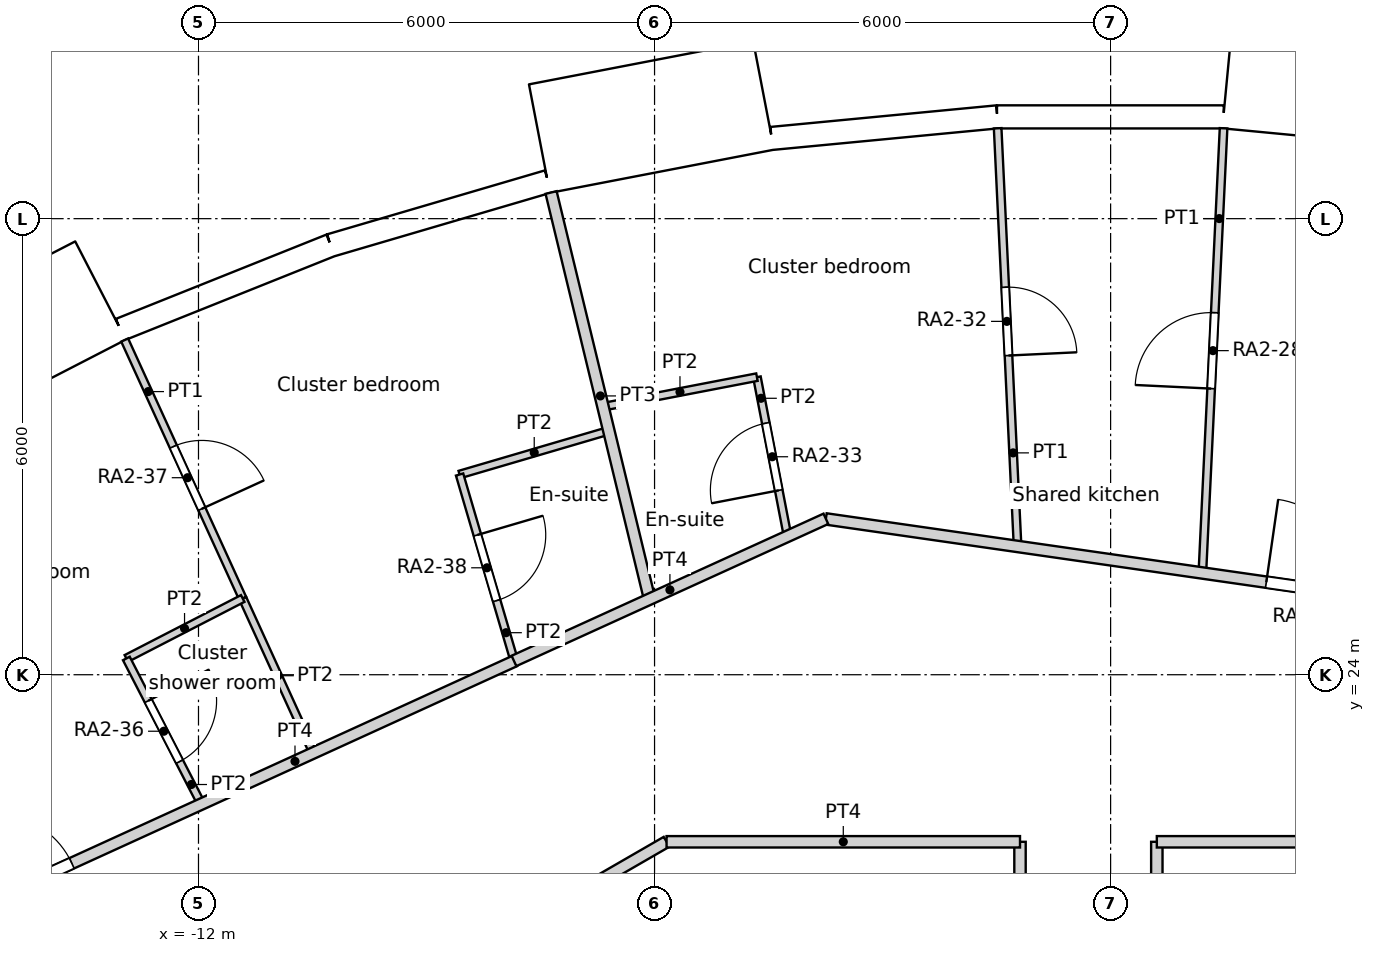
"""IFC4 building model, lengths in metres.
Left out: names, types, materials, properties, quantities, classifications, styles, units other than length and angle.
Written with IfcOpenShell. Run it as: python <this file> out.ifc"""

import sys

from ifc_helpers import new_model, si_unit, direction, frame, frame_2d, origin, origin_2d, place, context, subcontext, project, spatial, rectangle, circle, extrude, element, fill, save


model = new_model("IFC4")
c1 = context("Model", 3, precision=1e-05, world=origin(), true_north=direction((0.0, 1.0)))
c2 = subcontext(c1, "Body", "Model", "MODEL_VIEW")
j1 = project(units=[si_unit("LENGTHUNIT", "METRE"), si_unit("PLANEANGLEUNIT", "RADIAN")], contexts=[c1])
p1 = place(None, origin())
s1 = spatial("IfcSite", under=j1, at=p1, CompositionType="ELEMENT")
p2 = place(p1, origin())
s2 = spatial("IfcBuilding", under=s1, at=p2, CompositionType="ELEMENT")
p3 = place(p2, frame((0.0, 0.0, 39.0)))
s3 = spatial("IfcBuildingStorey", under=s2, at=p3, CompositionType="ELEMENT", Elevation=39.0)
for number, where, z_axis, x_axis in (
    (1, (1.44, 30.24, 0.0), (0.0, 0.0, 1.0), (1.0, 0.0, 0.0)),
    (2, (-4.309, 29.966, 0.0), (0.0, 0.0, 1.0), (1.0, 0.0, 0.0)),
    (3, (-9.902, 28.61, 0.0), (0.0, 0.0, 1.0), (1.0, 0.0, 0.0)),
):
    element("IfcColumn", number, at=place(p3, frame(where, z_axis=z_axis, x_axis=x_axis)), inside=s3, PredefinedType="COLUMN", context=c2, shape_type="SweptSolid", body=[
        extrude(circle(Radius=0.7, at=origin_2d()), origin(), (0.0, 0.0, 1.0), 3.6),
    ])
for number, where, z_axis, x_axis in (
    (4, (-1.427, 24.506, 0.0), (0.0, 0.0, 1.0), (1.0, 0.0, 0.0)),
    (5, (-7.04, 23.516, 0.0), (0.0, 0.0, 1.0), (1.0, 0.0, 0.0)),
    (6, (-12.274, 21.259, 0.0), (0.0, 0.0, 1.0), (1.0, 0.0, 0.0)),
):
    element("IfcColumn", number, at=place(p3, frame(where, z_axis=z_axis, x_axis=x_axis)), inside=s3, PredefinedType="COLUMN", context=c2, shape_type="SweptSolid", body=[
        extrude(circle(Radius=0.75, at=origin_2d()), origin(), (0.0, 0.0, 1.0), 3.6),
    ])
p4 = place(p3, frame((4.527, 31.627, -0.45), z_axis=(0.0, 0.0, 1.0), x_axis=(-0.995472768558, 0.09504718333, 0.0)))
e7 = element("IfcWall", 7, at=p4, inside=s3, PredefinedType="ELEMENTEDWALL", context=c2, shape_type="SweptSolid", body=[
    extrude(rectangle(XDim=3.0, YDim=1.45, at=frame_2d((1.5, 0.0))), origin(), (0.0, 0.0, 1.0), 3.6),
])
p5 = place(p4, frame((1.5, 0.0, 2.0)))
e8 = element("IfcOpeningElement", 8, at=p5, cuts=e7, PredefinedType="OPENING", context=c2, shape_type="SweptSolid", body=[
    extrude(circle(Radius=0.9, at=origin_2d()), frame((0.0, 0.735, 0.0), z_axis=(0.0, -1.0, 0.0), x_axis=(1.0, 0.0, 0.0)), (0.0, 0.0, 1.0), 1.47),
])
p6 = place(p3, frame((1.487, 31.339, 0.0), z_axis=(0.0, 0.0, 1.0), x_axis=(-1.0, 0.0, 0.0)))
e9 = element("IfcWall", 9, at=p6, inside=s3, PredefinedType="SOLIDWALL", context=c2, shape_type="SweptSolid", body=[
    extrude(rectangle(XDim=2.98, YDim=0.3, at=frame_2d((1.49, 0.0))), origin(), (0.0, 0.0, 1.0), 3.15),
])
p7 = place(p6, frame((1.49, 0.0, 1.55)))
e10 = element("IfcOpeningElement", 10, at=p7, cuts=e9, PredefinedType="OPENING", context=c2, shape_type="SweptSolid", body=[
    extrude(circle(Radius=0.9, at=origin_2d()), frame((0.0, 0.16, 0.0), z_axis=(0.0, -1.0, 0.0), x_axis=(1.0, 0.0, 0.0)), (0.0, 0.0, 1.0), 0.32),
])
p8 = place(p3, frame((-1.493, 31.339, 0.0), z_axis=(0.0, 0.0, 1.0), x_axis=(-0.995472611385, -0.095048829468, 0.0)))
e11 = element("IfcWall", 11, at=p8, inside=s3, PredefinedType="SOLIDWALL", context=c2, shape_type="SweptSolid", body=[
    extrude(rectangle(XDim=2.979, YDim=0.3, at=frame_2d((1.49, 0.0))), origin(), (0.0, 0.0, 1.0), 3.15),
])
p9 = place(p8, frame((1.49, 0.0, 1.55)))
e12 = element("IfcOpeningElement", 12, at=p9, cuts=e11, PredefinedType="OPENING", context=c2, shape_type="SweptSolid", body=[
    extrude(circle(Radius=0.9, at=origin_2d()), frame((0.0, 0.16, 0.0), z_axis=(0.0, -1.0, 0.0), x_axis=(1.0, 0.0, 0.0)), (0.0, 0.0, 1.0), 0.32),
])
p10 = place(p3, frame((-4.567, 31.621, -0.45), z_axis=(0.0, 0.0, 1.0), x_axis=(-0.981921602273, -0.189288052949, 0.0)))
e13 = element("IfcWall", 13, at=p10, inside=s3, PredefinedType="ELEMENTEDWALL", context=c2, shape_type="SweptSolid", body=[
    extrude(rectangle(XDim=3.0, YDim=1.45, at=frame_2d((1.5, 0.0))), origin(), (0.0, 0.0, 1.0), 3.6),
])
p11 = place(p10, frame((1.5, 0.0, 2.0)))
e14 = element("IfcOpeningElement", 14, at=p11, cuts=e13, PredefinedType="OPENING", context=c2, shape_type="SweptSolid", body=[
    extrude(circle(Radius=0.9, at=origin_2d()), frame((0.0, 0.735, 0.0), z_axis=(0.0, -1.0, 0.0), x_axis=(1.0, 0.0, 0.0)), (0.0, 0.0, 1.0), 1.47),
])
p12 = place(p3, frame((-7.403, 30.488, 0.0), z_axis=(0.0, 0.0, 1.0), x_axis=(-0.959501085144, -0.281704930036, 0.0)))
e15 = element("IfcWall", 15, at=p12, inside=s3, PredefinedType="SOLIDWALL", context=c2, shape_type="SweptSolid", body=[
    extrude(rectangle(XDim=2.979, YDim=0.3, at=frame_2d((1.49, 0.0))), origin(), (0.0, 0.0, 1.0), 3.15),
])
p13 = place(p12, frame((1.49, 0.0, 1.55)))
e16 = element("IfcOpeningElement", 16, at=p13, cuts=e15, PredefinedType="OPENING", context=c2, shape_type="SweptSolid", body=[
    extrude(circle(Radius=0.9, at=origin_2d()), frame((0.0, 0.16, 0.0), z_axis=(0.0, -1.0, 0.0), x_axis=(1.0, 0.0, 0.0)), (0.0, 0.0, 1.0), 0.32),
])
p14 = place(p3, frame((-10.261, 29.649, 0.0), z_axis=(0.0, 0.0, 1.0), x_axis=(-0.928374947, -0.371644935098, 0.0)))
e17 = element("IfcWall", 17, at=p14, inside=s3, PredefinedType="SOLIDWALL", context=c2, shape_type="SweptSolid", body=[
    extrude(rectangle(XDim=2.98, YDim=0.3, at=frame_2d((1.49, 0.0))), origin(), (0.0, 0.0, 1.0), 3.15),
])
p15 = place(p14, frame((1.49, 0.0, 1.55)))
e18 = element("IfcOpeningElement", 18, at=p15, cuts=e17, PredefinedType="OPENING", context=c2, shape_type="SweptSolid", body=[
    extrude(circle(Radius=0.9, at=origin_2d()), frame((0.0, 0.16, 0.0), z_axis=(0.0, -1.0, 0.0), x_axis=(1.0, 0.0, 0.0)), (0.0, 0.0, 1.0), 0.32),
])
p16 = place(p3, frame((-13.291, 29.053, -0.45), z_axis=(0.0, 0.0, 1.0), x_axis=(-0.888858064689, -0.458182650083, 0.0)))
e19 = element("IfcWall", 19, at=p16, inside=s3, PredefinedType="ELEMENTEDWALL", context=c2, shape_type="SweptSolid", body=[
    extrude(rectangle(XDim=3.0, YDim=1.45, at=frame_2d((1.5, 0.0))), origin(), (0.0, 0.0, 1.0), 3.6),
])
p17 = place(p16, frame((1.5, 0.0, 2.0)))
e20 = element("IfcOpeningElement", 20, at=p17, cuts=e19, PredefinedType="OPENING", context=c2, shape_type="SweptSolid", body=[
    extrude(circle(Radius=0.9, at=origin_2d()), frame((0.0, 0.735, 0.0), z_axis=(0.0, -1.0, 0.0), x_axis=(1.0, 0.0, 0.0)), (0.0, 0.0, 1.0), 1.47),
])
p18 = place(p3, frame((-1.192, 11.8, 0.0), z_axis=(0.0, 0.0, 1.0), x_axis=(0.0, 1.0, 0.0)))
e21 = element("IfcWall", 21, at=p18, inside=s3, PredefinedType="PARTITIONING", context=c2, shape_type="SweptSolid", body=[
    extrude(rectangle(XDim=10.002, YDim=0.15, at=frame_2d((5.001, 0.0))), origin(), (0.0, 0.0, 1.0), 3.15),
])
p19 = place(p3, frame((-5.842, 21.802, 0.0), z_axis=(0.0, 0.0, 1.0), x_axis=(1.0, 0.0, 0.0)))
e22 = element("IfcWall", 22, at=p19, inside=s3, PredefinedType="PARTITIONING", context=c2, shape_type="SweptSolid", body=[
    extrude(rectangle(XDim=4.65, YDim=0.15, at=frame_2d((2.325, 0.0))), origin(), (0.0, 0.0, 1.0), 3.15),
])
p20 = place(p3, frame((-14.0, 17.092, 0.0), z_axis=(0.0, 0.0, 1.0), x_axis=(0.86602719091, 0.499996904595, 0.0)))
e23 = element("IfcWall", 23, at=p20, inside=s3, PredefinedType="PARTITIONING", context=c2, shape_type="SweptSolid", body=[
    extrude(rectangle(XDim=9.42, YDim=0.15, at=frame_2d((4.71, 0.0))), origin(), (0.0, 0.0, 1.0), 3.15),
])
p21 = place(p3, frame((0.608, 21.802, 0.0), z_axis=(0.0, 0.0, 1.0), x_axis=(1.0, 0.0, 0.0)))
e24 = element("IfcWall", 24, at=p21, inside=s3, PredefinedType="PARTITIONING", context=c2, shape_type="SweptSolid", body=[
    extrude(rectangle(XDim=5.234, YDim=0.15, at=frame_2d((2.617, 0.0))), origin(), (0.0, 0.0, 1.0), 3.15),
])
p22 = place(p3, frame((0.608, 11.8, 0.0), z_axis=(0.0, 0.0, 1.0), x_axis=(0.0, 1.0, 0.0)))
e25 = element("IfcWall", 25, at=p22, inside=s3, PredefinedType="PARTITIONING", context=c2, shape_type="SweptSolid", body=[
    extrude(rectangle(XDim=10.002, YDim=0.15, at=frame_2d((5.001, 0.0))), origin(), (0.0, 0.0, 1.0), 3.15),
])
p23 = place(p22, frame((4.201, 0.0, 0.0)))
e26 = element("IfcOpeningElement", 26, at=p23, cuts=e25, PredefinedType="OPENING", context=c2, shape_type="SweptSolid", body=[
    extrude(rectangle(XDim=1.5, YDim=2.1, at=frame_2d((0.75, 1.05))), frame((0.0, 0.075, 0.0), z_axis=(0.0, -1.0, 0.0), x_axis=(1.0, 0.0, 0.0)), (0.0, 0.0, 1.0), 0.15),
])
p24 = place(p3, frame((-3.746, 26.05, 0.0), z_axis=(0.0, 0.0, 1.0), x_axis=(0.989841871115, -0.14217267736, 0.0)))
e27 = element("IfcWall", 27, at=p24, inside=s3, PredefinedType="PARTITIONING", context=c2, shape_type="SweptSolid", body=[
    extrude(rectangle(XDim=14.83, YDim=0.15, at=frame_2d((7.415, 0.0))), origin(), (0.0, 0.0, 1.0), 3.15),
])
p25 = place(p24, frame((5.854, 0.0, 0.0)))
e28 = element("IfcOpeningElement", 28, at=p25, cuts=e27, PredefinedType="OPENING", context=c2, shape_type="SweptSolid", body=[
    extrude(rectangle(XDim=1.1, YDim=2.1, at=frame_2d((0.55, 1.05))), frame((0.0, 0.075, 0.0), z_axis=(0.0, -1.0, 0.0), x_axis=(1.0, 0.0, 0.0)), (0.0, 0.0, 1.0), 0.15),
])
p26 = place(p3, frame((-7.85, 24.181, 0.0), z_axis=(0.0, 0.0, 1.0), x_axis=(0.909998999892, 0.414610443906, 0.0)))
e29 = element("IfcWall", 29, at=p26, inside=s3, PredefinedType="PARTITIONING", context=c2, shape_type="SweptSolid", body=[
    extrude(rectangle(XDim=4.509, YDim=0.15, at=frame_2d((2.255, 0.0))), origin(), (0.0, 0.0, 1.0), 3.15),
])
p27 = place(p3, frame((-17.235, 19.89, 0.0), z_axis=(0.0, 0.0, 1.0), x_axis=(0.909655192768, 0.415364213999, 0.0)))
e30 = element("IfcWall", 30, at=p27, inside=s3, PredefinedType="PARTITIONING", context=c2, shape_type="SweptSolid", body=[
    extrude(rectangle(XDim=10.328, YDim=0.15, at=frame_2d((5.164, 0.0))), origin(), (0.0, 0.0, 1.0), 3.15),
])
p28 = place(p27, frame((2.823, 0.0, 0.0)))
e31 = element("IfcOpeningElement", 31, at=p28, cuts=e30, PredefinedType="OPENING", context=c2, shape_type="SweptSolid", body=[
    extrude(rectangle(XDim=1.1, YDim=2.1, at=frame_2d((0.55, 1.05))), frame((0.0, 0.075, 0.0), z_axis=(0.0, -1.0, 0.0), x_axis=(1.0, 0.0, 0.0)), (0.0, 0.0, 1.0), 0.15),
])
p29 = place(p3, frame((1.207, 25.339, 0.0), z_axis=(0.0, 0.0, 1.0), x_axis=(0.047648334785, 0.998864173045, 0.0)))
e32 = element("IfcWall", 32, at=p29, inside=s3, PredefinedType="PARTITIONING", context=c2, shape_type="SweptSolid", body=[
    extrude(rectangle(XDim=5.856, YDim=0.1, at=frame_2d((2.928, 0.0))), origin(), (0.0, 0.0, 1.0), 3.15),
])
p30 = place(p29, frame((2.428, 0.0, 0.0)))
e33 = element("IfcOpeningElement", 33, at=p30, cuts=e32, PredefinedType="OPENING", context=c2, shape_type="SweptSolid", body=[
    extrude(rectangle(XDim=1.0, YDim=2.04, at=frame_2d((0.5, 1.02))), frame((0.0, 0.05, 0.0), z_axis=(0.0, -1.0, 0.0), x_axis=(1.0, 0.0, 0.0)), (0.0, 0.0, 1.0), 0.1),
])
p31 = place(p3, frame((-1.486, 31.189, 0.0), z_axis=(0.0, 0.0, 1.0), x_axis=(0.047567255643, -0.998868037426, 0.0)))
e34 = element("IfcWall", 34, at=p31, inside=s3, PredefinedType="PARTITIONING", context=c2, shape_type="SweptSolid", body=[
    extrude(rectangle(XDim=5.507, YDim=0.1, at=frame_2d((2.754, 0.0))), origin(), (0.0, 0.0, 1.0), 3.15),
])
p32 = place(p31, frame((2.093, 0.0, 0.0)))
e35 = element("IfcOpeningElement", 35, at=p32, cuts=e34, PredefinedType="OPENING", context=c2, shape_type="SweptSolid", body=[
    extrude(rectangle(XDim=0.9, YDim=2.1, at=frame_2d((0.45, 1.05))), frame((0.0, 0.05, 0.0), z_axis=(0.0, -1.0, 0.0), x_axis=(1.0, 0.0, 0.0)), (0.0, 0.0, 1.0), 0.1),
])
p33 = place(p3, frame((-4.653, 27.915, 0.0), z_axis=(0.0, 0.0, 1.0), x_axis=(0.189463029113, -0.981887855409, 0.0)))
e36 = element("IfcWall", 36, at=p33, inside=s3, PredefinedType="PARTITIONING", context=c2, shape_type="SweptSolid", body=[
    extrude(rectangle(XDim=2.133, YDim=0.1, at=frame_2d((1.066, 0.0))), origin(), (0.0, 0.0, 1.0), 3.15),
])
p34 = place(p33, frame((0.617, 0.0, 0.0)))
e37 = element("IfcOpeningElement", 37, at=p34, cuts=e36, PredefinedType="OPENING", context=c2, shape_type="SweptSolid", body=[
    extrude(rectangle(XDim=0.9, YDim=2.04, at=frame_2d((0.45, 1.02))), frame((0.0, 0.05, 0.0), z_axis=(0.0, -1.0, 0.0), x_axis=(1.0, 0.0, 0.0)), (0.0, 0.0, 1.0), 0.1),
])
p35 = place(p3, frame((-6.678, 27.525, 0.0), z_axis=(0.0, 0.0, 1.0), x_axis=(0.981940520272, 0.18918989045, 0.0)))
e38 = element("IfcWall", 38, at=p35, inside=s3, PredefinedType="PARTITIONING", context=c2, shape_type="SweptSolid", body=[
    extrude(rectangle(XDim=2.062, YDim=0.1, at=frame_2d((1.031, 0.0))), origin(), (0.0, 0.0, 1.0), 3.15),
])
p36 = place(p3, frame((-7.361, 30.344, 0.0), z_axis=(0.0, 0.0, 1.0), x_axis=(0.235488368932, -0.971877167186, 0.0)))
e39 = element("IfcWall", 39, at=p36, inside=s3, PredefinedType="PARTITIONING", context=c2, shape_type="SweptSolid", body=[
    extrude(rectangle(XDim=5.507, YDim=0.15, at=frame_2d((2.753, 0.0))), origin(), (0.0, 0.0, 1.0), 3.15),
])
p37 = place(p3, frame((-12.949, 24.214, 0.0), z_axis=(0.0, 0.0, 1.0), x_axis=(0.888946574069, 0.458010904292, 0.0)))
e40 = element("IfcWall", 40, at=p37, inside=s3, PredefinedType="PARTITIONING", context=c2, shape_type="SweptSolid", body=[
    extrude(rectangle(XDim=1.722, YDim=0.1, at=frame_2d((0.861, 0.0))), origin(), (0.0, 0.0, 1.0), 3.15),
])
p38 = place(p3, frame((-12.949, 24.214, 0.0), z_axis=(0.0, 0.0, 1.0), x_axis=(0.458149254338, -0.888875278512, 0.0)))
e41 = element("IfcWall", 41, at=p38, inside=s3, PredefinedType="PARTITIONING", context=c2, shape_type="SweptSolid", body=[
    extrude(rectangle(XDim=2.155, YDim=0.1, at=frame_2d((1.077, 0.0))), origin(), (0.0, 0.0, 1.0), 3.15),
])
p39 = place(p38, frame((0.627, 0.0, 0.0)))
e42 = element("IfcOpeningElement", 42, at=p39, cuts=e41, PredefinedType="OPENING", context=c2, shape_type="SweptSolid", body=[
    extrude(rectangle(XDim=0.9, YDim=2.0, at=frame_2d((0.45, 1.0))), frame((0.0, 0.05, 0.0), z_axis=(0.0, -1.0, 0.0), x_axis=(1.0, 0.0, 0.0)), (0.0, 0.0, 1.0), 0.1),
])
p40 = place(p3, frame((-12.971, 28.403, 0.0), z_axis=(0.0, 0.0, 1.0), x_axis=(0.415455663581, -0.909613429759, 0.0)))
e43 = element("IfcWall", 43, at=p40, inside=s3, PredefinedType="PARTITIONING", context=c2, shape_type="SweptSolid", body=[
    extrude(rectangle(XDim=3.738, YDim=0.1, at=frame_2d((1.869, 0.0))), origin(), (0.0, 0.0, 1.0), 3.15),
])
p41 = place(p40, frame((1.541, 0.0, 0.0)))
e44 = element("IfcOpeningElement", 44, at=p41, cuts=e43, PredefinedType="OPENING", context=c2, shape_type="SweptSolid", body=[
    extrude(rectangle(XDim=0.9, YDim=2.1, at=frame_2d((0.45, 1.05))), frame((0.0, 0.05, 0.0), z_axis=(0.0, -1.0, 0.0), x_axis=(1.0, 0.0, 0.0)), (0.0, 0.0, 1.0), 0.1),
])
p42 = place(p3, frame((-11.418, 25.003, 0.0), z_axis=(0.0, 0.0, 1.0), x_axis=(0.415416212057, -0.909631447764, 0.0)))
e45 = element("IfcWall", 45, at=p42, inside=s3, PredefinedType="PARTITIONING", context=c2, shape_type="SweptSolid", body=[
    extrude(rectangle(XDim=2.234, YDim=0.1, at=frame_2d((1.117, 0.0))), origin(), (0.0, 0.0, 1.0), 3.15),
])
p43 = place(p3, frame((-8.565, 26.634, 0.0), z_axis=(0.0, 0.0, 1.0), x_axis=(0.959587452417, 0.281410591777, 0.0)))
e46 = element("IfcWall", 46, at=p43, inside=s3, PredefinedType="PARTITIONING", context=c2, shape_type="SweptSolid", body=[
    extrude(rectangle(XDim=2.047, YDim=0.1, at=frame_2d((1.023, 0.0))), origin(), (0.0, 0.0, 1.0), 3.15),
])
p44 = place(p3, frame((-8.565, 26.634, 0.0), z_axis=(0.0, 0.0, 1.0), x_axis=(0.281758205139, -0.959485442222, 0.0)))
e47 = element("IfcWall", 47, at=p44, inside=s3, PredefinedType="PARTITIONING", context=c2, shape_type="SweptSolid", body=[
    extrude(rectangle(XDim=2.559, YDim=0.1, at=frame_2d((1.279, 0.0))), origin(), (0.0, 0.0, 1.0), 3.15),
])
p45 = place(p44, frame((0.829, 0.0, 0.0)))
e48 = element("IfcOpeningElement", 48, at=p45, cuts=e47, PredefinedType="OPENING", context=c2, shape_type="SweptSolid", body=[
    extrude(rectangle(XDim=0.9, YDim=2.04, at=frame_2d((0.45, 1.02))), frame((0.0, 0.05, 0.0), z_axis=(0.0, -1.0, 0.0), x_axis=(1.0, 0.0, 0.0)), (0.0, 0.0, 1.0), 0.1),
])
p46 = place(p5, origin())
e49 = element("IfcWindow", 49, at=p46, inside=s3, PartitioningType="SINGLE_PANEL", PredefinedType="WINDOW", context=c2, shape_type="SweptSolid", body=[
    extrude(circle(Radius=0.9, at=origin_2d()), frame((0.0, 0.695, 0.0), z_axis=(0.0, -1.0, 0.0), x_axis=(1.0, 0.0, 0.0)), (0.0, 0.0, 1.0), 0.1),
])
fill(e8, e49)
p47 = place(p7, origin())
e50 = element("IfcWindow", 50, at=p47, inside=s3, PartitioningType="SINGLE_PANEL", PredefinedType="WINDOW", context=c2, shape_type="SweptSolid", body=[
    extrude(circle(Radius=0.9, at=origin_2d()), frame((0.0, 0.12, 0.0), z_axis=(0.0, -1.0, 0.0), x_axis=(1.0, 0.0, 0.0)), (0.0, 0.0, 1.0), 0.1),
])
fill(e10, e50)
p48 = place(p9, origin())
e51 = element("IfcWindow", 51, at=p48, inside=s3, PartitioningType="SINGLE_PANEL", PredefinedType="WINDOW", context=c2, shape_type="SweptSolid", body=[
    extrude(circle(Radius=0.9, at=origin_2d()), frame((0.0, 0.12, 0.0), z_axis=(0.0, -1.0, 0.0), x_axis=(1.0, 0.0, 0.0)), (0.0, 0.0, 1.0), 0.1),
])
fill(e12, e51)
p49 = place(p11, origin())
e52 = element("IfcWindow", 52, at=p49, inside=s3, PartitioningType="SINGLE_PANEL", PredefinedType="WINDOW", context=c2, shape_type="SweptSolid", body=[
    extrude(circle(Radius=0.9, at=origin_2d()), frame((0.0, 0.695, 0.0), z_axis=(0.0, -1.0, 0.0), x_axis=(1.0, 0.0, 0.0)), (0.0, 0.0, 1.0), 0.1),
])
fill(e14, e52)
p50 = place(p13, origin())
e53 = element("IfcWindow", 53, at=p50, inside=s3, PartitioningType="SINGLE_PANEL", PredefinedType="WINDOW", context=c2, shape_type="SweptSolid", body=[
    extrude(circle(Radius=0.9, at=origin_2d()), frame((0.0, 0.12, 0.0), z_axis=(0.0, -1.0, 0.0), x_axis=(1.0, 0.0, 0.0)), (0.0, 0.0, 1.0), 0.1),
])
fill(e16, e53)
p51 = place(p15, origin())
e54 = element("IfcWindow", 54, at=p51, inside=s3, PartitioningType="SINGLE_PANEL", PredefinedType="WINDOW", context=c2, shape_type="SweptSolid", body=[
    extrude(circle(Radius=0.9, at=origin_2d()), frame((0.0, 0.12, 0.0), z_axis=(0.0, -1.0, 0.0), x_axis=(1.0, 0.0, 0.0)), (0.0, 0.0, 1.0), 0.1),
])
fill(e18, e54)
p52 = place(p17, origin())
e55 = element("IfcWindow", 55, at=p52, inside=s3, PartitioningType="SINGLE_PANEL", PredefinedType="WINDOW", context=c2, shape_type="SweptSolid", body=[
    extrude(circle(Radius=0.9, at=origin_2d()), frame((0.0, 0.695, 0.0), z_axis=(0.0, -1.0, 0.0), x_axis=(1.0, 0.0, 0.0)), (0.0, 0.0, 1.0), 0.1),
])
fill(e20, e55)
p53 = place(p25, origin())
e56 = element("IfcDoor", 56, at=p53, inside=s3, OperationType="SINGLE_SWING_LEFT", PredefinedType="DOOR", context=c2, shape_type="SweptSolid", body=[
    extrude(rectangle(XDim=1.1, YDim=2.1, at=frame_2d((0.55, 1.05))), frame((0.0, 0.025, 0.0), z_axis=(0.0, -1.0, 0.0), x_axis=(1.0, 0.0, 0.0)), (0.0, 0.0, 1.0), 0.05),
])
fill(e28, e56)
p54 = place(p30, origin())
e57 = element("IfcDoor", 57, at=p54, inside=s3, OperationType="SINGLE_SWING_LEFT", PredefinedType="DOOR", context=c2, shape_type="SweptSolid", body=[
    extrude(rectangle(XDim=1.0, YDim=2.04, at=frame_2d((0.5, 1.02))), frame((0.0, 0.025, 0.0), z_axis=(0.0, -1.0, 0.0), x_axis=(1.0, 0.0, 0.0)), (0.0, 0.0, 1.0), 0.05),
])
fill(e33, e57)
p55 = place(p32, origin())
e58 = element("IfcDoor", 58, at=p55, inside=s3, OperationType="SINGLE_SWING_RIGHT", PredefinedType="DOOR", context=c2, shape_type="SweptSolid", body=[
    extrude(rectangle(XDim=0.9, YDim=2.1, at=frame_2d((0.45, 1.05))), frame((0.0, 0.025, 0.0), z_axis=(0.0, -1.0, 0.0), x_axis=(1.0, 0.0, 0.0)), (0.0, 0.0, 1.0), 0.05),
])
fill(e35, e58)
p56 = place(p34, origin())
e59 = element("IfcDoor", 59, at=p56, inside=s3, OperationType="SINGLE_SWING_LEFT", PredefinedType="DOOR", context=c2, shape_type="SweptSolid", body=[
    extrude(rectangle(XDim=0.9, YDim=2.04, at=frame_2d((0.45, 1.02))), frame((0.0, 0.025, 0.0), z_axis=(0.0, -1.0, 0.0), x_axis=(1.0, 0.0, 0.0)), (0.0, 0.0, 1.0), 0.05),
])
fill(e37, e59)
p57 = place(p28, origin())
e60 = element("IfcDoor", 60, at=p57, inside=s3, OperationType="SINGLE_SWING_LEFT", PredefinedType="DOOR", context=c2, shape_type="SweptSolid", body=[
    extrude(rectangle(XDim=1.1, YDim=2.1, at=frame_2d((0.55, 1.05))), frame((0.0, 0.025, 0.0), z_axis=(0.0, -1.0, 0.0), x_axis=(1.0, 0.0, 0.0)), (0.0, 0.0, 1.0), 0.05),
])
fill(e31, e60)
p58 = place(p39, origin())
e61 = element("IfcDoor", 61, at=p58, inside=s3, OperationType="SINGLE_SWING_LEFT", PredefinedType="DOOR", context=c2, shape_type="SweptSolid", body=[
    extrude(rectangle(XDim=0.9, YDim=2.0, at=frame_2d((0.45, 1.0))), frame((0.0, 0.025, 0.0), z_axis=(0.0, -1.0, 0.0), x_axis=(1.0, 0.0, 0.0)), (0.0, 0.0, 1.0), 0.05),
])
fill(e42, e61)
p59 = place(p41, origin())
e62 = element("IfcDoor", 62, at=p59, inside=s3, OperationType="SINGLE_SWING_RIGHT", PredefinedType="DOOR", context=c2, shape_type="SweptSolid", body=[
    extrude(rectangle(XDim=0.9, YDim=2.1, at=frame_2d((0.45, 1.05))), frame((0.0, 0.025, 0.0), z_axis=(0.0, -1.0, 0.0), x_axis=(1.0, 0.0, 0.0)), (0.0, 0.0, 1.0), 0.05),
])
fill(e44, e62)
p60 = place(p45, origin())
e63 = element("IfcDoor", 63, at=p60, inside=s3, OperationType="SINGLE_SWING_LEFT", PredefinedType="DOOR", context=c2, shape_type="SweptSolid", body=[
    extrude(rectangle(XDim=0.9, YDim=2.04, at=frame_2d((0.45, 1.02))), frame((0.0, 0.025, 0.0), z_axis=(0.0, -1.0, 0.0), x_axis=(1.0, 0.0, 0.0)), (0.0, 0.0, 1.0), 0.05),
])
fill(e48, e63)
save(model, sys.argv[1])
